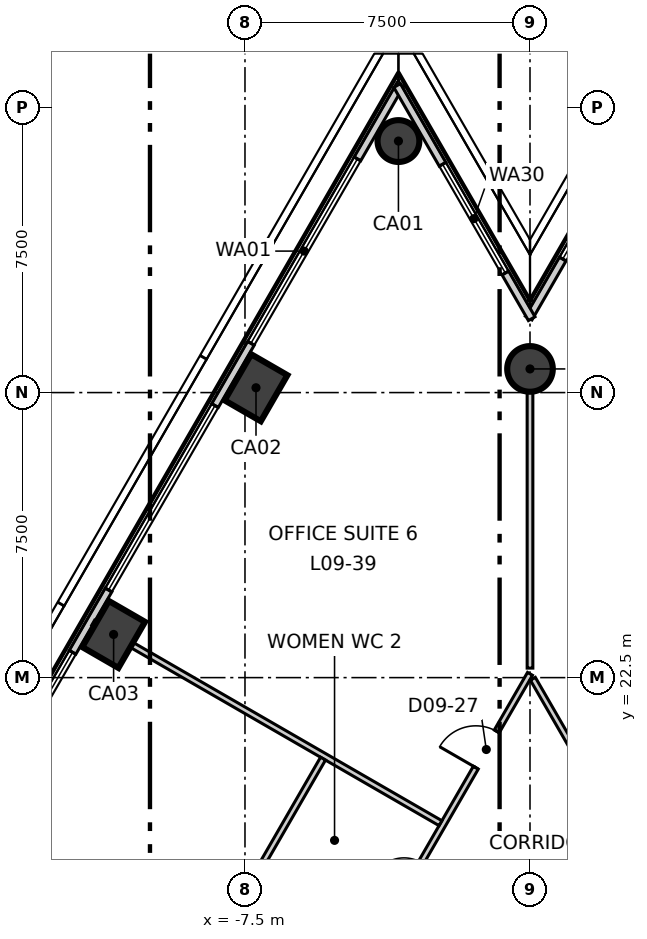
"""IFC4 building model, lengths in metres.
Left out: names, types, materials, properties, quantities, classifications, styles, units other than length and angle.
Written with IfcOpenShell. Run it as: python <this file> out.ifc"""

import sys

from ifc_helpers import new_model, si_unit, direction, frame, frame_2d, origin, origin_2d, place, context, subcontext, project, spatial, rectangle, circle, extrude, element, fill, save


model = new_model("IFC4")
c1 = context("Model", 3, precision=1e-05, world=origin(), true_north=direction((0.0, 1.0)))
c2 = subcontext(c1, "Body", "Model", "MODEL_VIEW")
j1 = project(units=[si_unit("LENGTHUNIT", "METRE"), si_unit("PLANEANGLEUNIT", "RADIAN")], contexts=[c1])
p1 = place(None, origin())
s1 = spatial("IfcSite", under=j1, at=p1, CompositionType="ELEMENT")
p2 = place(p1, origin())
s2 = spatial("IfcBuilding", under=s1, at=p2, CompositionType="ELEMENT")
p3 = place(p2, frame((0.0, 0.0, 47.3)))
s3 = spatial("IfcBuildingStorey", under=s2, at=p3, CompositionType="ELEMENT", Elevation=47.3)
p4 = place(p3, frame((-3.462, 36.618, -0.3), z_axis=(0.0, 0.0, 1.0), x_axis=(0.5, 0.866025403784, 0.0)))
e1 = element("IfcColumn", 1, at=p4, inside=s3, PredefinedType="COLUMN", context=c2, shape_type="SweptSolid", body=[
    extrude(circle(Radius=0.55, at=origin_2d()), origin(), (0.0, 0.0, 1.0), 4.0),
])
for number, where, z_axis, x_axis in (
    (2, (-7.21, 30.127, -0.3), (0.0, 0.0, 1.0), (0.5, 0.866, 0.0)),
    (3, (-10.957, 23.636, -0.3), (0.0, 0.0, 1.0), (0.5, 0.866, 0.0)),
):
    element("IfcColumn", number, at=place(p3, frame(where, z_axis=z_axis, x_axis=x_axis)), inside=s3, PredefinedType="COLUMN", context=c2, shape_type="SweptSolid", body=[
        extrude(rectangle(XDim=1.4, YDim=1.1, at=origin_2d()), origin(), (0.0, 0.0, 1.0), 4.0),
    ])
p5 = place(p3, frame((0.0, 30.622, -0.3), z_axis=(0.0, 0.0, 1.0), x_axis=(1.0, 0.0, 0.0)))
e4 = element("IfcColumn", 4, at=p5, inside=s3, PredefinedType="COLUMN", context=c2, shape_type="SweptSolid", body=[
    extrude(circle(Radius=0.6, at=origin_2d()), origin(), (0.0, 0.0, 1.0), 4.0),
])
p6 = place(p3, frame((-3.417, 38.096, 0.0), z_axis=(0.0, 0.0, 1.0), x_axis=(-0.500000412988, -0.866025165346, 0.0)))
e5 = element("IfcWall", 5, at=p6, inside=s3, PredefinedType="ELEMENTEDWALL", context=c2, shape_type="SweptSolid", body=[
    extrude(rectangle(XDim=62.548, YDim=0.2, at=frame_2d((31.274, 0.0))), origin(), (0.0, 0.0, 1.0), 3.7),
])
p7 = place(p6, frame((2.25, 0.0, 0.9)))
e6 = element("IfcOpeningElement", 6, at=p7, cuts=e5, PredefinedType="OPENING", context=c2, shape_type="SweptSolid", body=[
    extrude(rectangle(XDim=5.6, YDim=2.5, at=frame_2d((2.8, 1.25))), frame((0.0, 0.11, 0.0), z_axis=(0.0, -1.0, 0.0), x_axis=(1.0, 0.0, 0.0)), (0.0, 0.0, 1.0), 0.22),
])
p8 = place(p6, frame((9.745, 0.0, 0.9)))
e7 = element("IfcOpeningElement", 7, at=p8, cuts=e5, PredefinedType="OPENING", context=c2, shape_type="SweptSolid", body=[
    extrude(rectangle(XDim=5.6, YDim=2.5, at=frame_2d((2.8, 1.25))), frame((0.0, 0.11, 0.0), z_axis=(0.0, -1.0, 0.0), x_axis=(1.0, 0.0, 0.0)), (0.0, 0.0, 1.0), 0.22),
])
p9 = place(p6, frame((17.241, 0.0, 0.9)))
e8 = element("IfcOpeningElement", 8, at=p9, cuts=e5, PredefinedType="OPENING", context=c2, shape_type="SweptSolid", body=[
    extrude(rectangle(XDim=5.6, YDim=2.5, at=frame_2d((2.8, 1.25))), frame((0.0, 0.11, 0.0), z_axis=(0.0, -1.0, 0.0), x_axis=(1.0, 0.0, 0.0)), (0.0, 0.0, 1.0), 0.22),
])
p10 = place(p6, frame((24.736, 0.0, 0.9)))
e9 = element("IfcOpeningElement", 9, at=p10, cuts=e5, PredefinedType="OPENING", context=c2, shape_type="SweptSolid", body=[
    extrude(rectangle(XDim=5.6, YDim=2.5, at=frame_2d((2.8, 1.25))), frame((0.0, 0.11, 0.0), z_axis=(0.0, -1.0, 0.0), x_axis=(1.0, 0.0, 0.0)), (0.0, 0.0, 1.0), 0.22),
])
p11 = place(p6, frame((32.231, 0.0, 0.9)))
e10 = element("IfcOpeningElement", 10, at=p11, cuts=e5, PredefinedType="OPENING", context=c2, shape_type="SweptSolid", body=[
    extrude(rectangle(XDim=5.6, YDim=2.5, at=frame_2d((2.8, 1.25))), frame((0.0, 0.11, 0.0), z_axis=(0.0, -1.0, 0.0), x_axis=(1.0, 0.0, 0.0)), (0.0, 0.0, 1.0), 0.22),
])
p12 = place(p6, frame((39.727, 0.0, 0.9)))
e11 = element("IfcOpeningElement", 11, at=p12, cuts=e5, PredefinedType="OPENING", context=c2, shape_type="SweptSolid", body=[
    extrude(rectangle(XDim=5.6, YDim=2.5, at=frame_2d((2.8, 1.25))), frame((0.0, 0.11, 0.0), z_axis=(0.0, -1.0, 0.0), x_axis=(1.0, 0.0, 0.0)), (0.0, 0.0, 1.0), 0.22),
])
p13 = place(p6, frame((47.222, 0.0, 0.9)))
e12 = element("IfcOpeningElement", 12, at=p13, cuts=e5, PredefinedType="OPENING", context=c2, shape_type="SweptSolid", body=[
    extrude(rectangle(XDim=5.6, YDim=2.5, at=frame_2d((2.8, 1.25))), frame((0.0, 0.11, 0.0), z_axis=(0.0, -1.0, 0.0), x_axis=(1.0, 0.0, 0.0)), (0.0, 0.0, 1.0), 0.22),
])
p14 = place(p6, frame((54.717, 0.0, 0.9)))
e13 = element("IfcOpeningElement", 13, at=p14, cuts=e5, PredefinedType="OPENING", context=c2, shape_type="SweptSolid", body=[
    extrude(rectangle(XDim=5.6, YDim=2.5, at=frame_2d((2.8, 1.25))), frame((0.0, 0.11, 0.0), z_axis=(0.0, -1.0, 0.0), x_axis=(1.0, 0.0, 0.0)), (0.0, 0.0, 1.0), 0.22),
])
p15 = place(p3, frame((3.507, 38.096, 0.0), z_axis=(0.0, 0.0, 1.0), x_axis=(-0.499993928037, -0.866028909405, 0.0)))
e14 = element("IfcWall", 14, at=p15, inside=s3, PredefinedType="ELEMENTEDWALL", context=c2, shape_type="SweptSolid", body=[
    extrude(rectangle(XDim=7.084, YDim=0.2, at=frame_2d((3.542, 0.0))), origin(), (0.0, 0.0, 1.0), 3.7),
])
p16 = place(p15, frame((1.99, 0.0, 0.9)))
e15 = element("IfcOpeningElement", 15, at=p16, cuts=e14, PredefinedType="OPENING", context=c2, shape_type="SweptSolid", body=[
    extrude(rectangle(XDim=3.3, YDim=2.5, at=frame_2d((1.65, 1.25))), frame((0.0, 0.11, 0.0), z_axis=(0.0, -1.0, 0.0), x_axis=(1.0, 0.0, 0.0)), (0.0, 0.0, 1.0), 0.22),
])
p17 = place(p3, frame((0.045, 31.944, 0.0), z_axis=(0.0, 0.0, 1.0), x_axis=(-0.499993928037, 0.866028909405, 0.0)))
e16 = element("IfcWall", 16, at=p17, inside=s3, PredefinedType="ELEMENTEDWALL", context=c2, shape_type="SweptSolid", body=[
    extrude(rectangle(XDim=7.084, YDim=0.2, at=frame_2d((3.542, 0.0))), origin(), (0.0, 0.0, 1.0), 3.7),
])
p18 = place(p17, frame((1.39, 0.0, 0.9)))
e17 = element("IfcOpeningElement", 17, at=p18, cuts=e16, PredefinedType="OPENING", context=c2, shape_type="SweptSolid", body=[
    extrude(rectangle(XDim=3.3, YDim=2.5, at=frame_2d((1.65, 1.25))), frame((0.0, 0.11, 0.0), z_axis=(0.0, -1.0, 0.0), x_axis=(1.0, 0.0, 0.0)), (0.0, 0.0, 1.0), 0.22),
])
p19 = place(p3, frame((-19.497, -11.17, 0.0), z_axis=(0.0, 0.0, 1.0), x_axis=(0.499998854553, 0.866026065108, 0.0)))
e18 = element("IfcWall", 18, at=p19, inside=s3, PredefinedType="PARTITIONING", context=c2, shape_type="SweptSolid", body=[
    extrude(rectangle(XDim=38.994, YDim=0.15, at=frame_2d((19.497, 0.0))), origin(), (0.0, 0.0, 1.0), 3.7),
])
p20 = place(p19, frame((36.144, 0.0, 0.0)))
e19 = element("IfcOpeningElement", 19, at=p20, cuts=e18, PredefinedType="OPENING", context=c2, shape_type="SweptSolid", body=[
    extrude(rectangle(XDim=1.1, YDim=2.1, at=frame_2d((0.55, 1.05))), frame((0.0, 0.085, 0.0), z_axis=(0.0, -1.0, 0.0), x_axis=(1.0, 0.0, 0.0)), (0.0, 0.0, 1.0), 0.17),
])
p21 = place(p19, frame((21.963, 0.0, 0.0)))
e20 = element("IfcOpeningElement", 20, at=p21, cuts=e18, PredefinedType="OPENING", context=c2, shape_type="SweptSolid", body=[
    extrude(rectangle(XDim=1.1, YDim=2.1, at=frame_2d((0.55, 1.05))), frame((0.0, 0.085, 0.0), z_axis=(0.0, -1.0, 0.0), x_axis=(1.0, 0.0, 0.0)), (0.0, 0.0, 1.0), 0.17),
])
p22 = place(p19, frame((32.363, 0.0, 0.0)))
e21 = element("IfcOpeningElement", 21, at=p22, cuts=e18, PredefinedType="OPENING", context=c2, shape_type="SweptSolid", body=[
    extrude(rectangle(XDim=0.9, YDim=2.1, at=frame_2d((0.45, 1.05))), frame((0.0, 0.085, 0.0), z_axis=(0.0, -1.0, 0.0), x_axis=(1.0, 0.0, 0.0)), (0.0, 0.0, 1.0), 0.17),
])
p23 = place(p19, frame((29.163, 0.0, 0.0)))
e22 = element("IfcOpeningElement", 22, at=p23, cuts=e18, PredefinedType="OPENING", context=c2, shape_type="SweptSolid", body=[
    extrude(rectangle(XDim=0.9, YDim=2.1, at=frame_2d((0.45, 1.05))), frame((0.0, 0.085, 0.0), z_axis=(0.0, -1.0, 0.0), x_axis=(1.0, 0.0, 0.0)), (0.0, 0.0, 1.0), 0.17),
])
p24 = place(p19, frame((26.263, 0.0, 0.0)))
e23 = element("IfcOpeningElement", 23, at=p24, cuts=e18, PredefinedType="OPENING", context=c2, shape_type="SweptSolid", body=[
    extrude(rectangle(XDim=1.0, YDim=2.1, at=frame_2d((0.5, 1.05))), frame((0.0, 0.085, 0.0), z_axis=(0.0, -1.0, 0.0), x_axis=(1.0, 0.0, 0.0)), (0.0, 0.0, 1.0), 0.17),
])
p25 = place(p19, frame((11.373, 0.0, 0.0)))
e24 = element("IfcOpeningElement", 24, at=p25, cuts=e18, PredefinedType="OPENING", context=c2, shape_type="SweptSolid", body=[
    extrude(rectangle(XDim=1.1, YDim=2.1, at=frame_2d((0.55, 1.05))), frame((0.0, 0.085, 0.0), z_axis=(0.0, -1.0, 0.0), x_axis=(1.0, 0.0, 0.0)), (0.0, 0.0, 1.0), 0.17),
])
p26 = place(p19, frame((1.581, 0.0, 0.0)))
e25 = element("IfcOpeningElement", 25, at=p26, cuts=e18, PredefinedType="OPENING", context=c2, shape_type="SweptSolid", body=[
    extrude(rectangle(XDim=1.1, YDim=2.1, at=frame_2d((0.55, 1.05))), frame((0.0, 0.085, 0.0), z_axis=(0.0, -1.0, 0.0), x_axis=(1.0, 0.0, 0.0)), (0.0, 0.0, 1.0), 0.17),
])
p27 = place(p3, frame((-11.494, 23.946, 0.0), z_axis=(0.0, 0.0, 1.0), x_axis=(0.866011810196, -0.500023544047, 0.0)))
e26 = element("IfcWall", 26, at=p27, inside=s3, PredefinedType="PARTITIONING", context=c2, shape_type="SweptSolid", body=[
    extrude(rectangle(XDim=10.552, YDim=0.15, at=frame_2d((5.276, 0.0))), origin(), (0.0, 0.0, 1.0), 3.7),
])
p28 = place(p3, frame((-9.808, 12.811, 0.0), z_axis=(0.0, 0.0, 1.0), x_axis=(0.49992187278, 0.866070505857, 0.0)))
e27 = element("IfcWall", 27, at=p28, inside=s3, PredefinedType="PARTITIONING", context=c2, shape_type="SweptSolid", body=[
    extrude(rectangle(XDim=8.726, YDim=0.15, at=frame_2d((4.363, 0.0))), origin(), (0.0, 0.0, 1.0), 3.7),
])
p29 = place(p3, frame((0.0, 22.75, 0.0), z_axis=(0.0, 0.0, 1.0), x_axis=(0.0, 1.0, 0.0)))
e28 = element("IfcWall", 28, at=p29, inside=s3, PredefinedType="PARTITIONING", context=c2, shape_type="SweptSolid", body=[
    extrude(rectangle(XDim=8.492, YDim=0.15, at=frame_2d((4.246, 0.0))), origin(), (0.0, 0.0, 1.0), 3.1),
])
p30 = place(p3, frame((0.075, 22.47, 0.0), z_axis=(0.0, 0.0, 1.0), x_axis=(0.500002280369, -0.866024087209, 0.0)))
e29 = element("IfcWall", 29, at=p30, inside=s3, PredefinedType="PARTITIONING", context=c2, shape_type="SweptSolid", body=[
    extrude(rectangle(XDim=38.844, YDim=0.15, at=frame_2d((19.422, 0.0))), origin(), (0.0, 0.0, 1.0), 3.7),
])
p31 = place(p30, frame((36.244, 0.0, 0.0)))
e30 = element("IfcOpeningElement", 30, at=p31, cuts=e29, PredefinedType="OPENING", context=c2, shape_type="SweptSolid", body=[
    extrude(rectangle(XDim=1.0, YDim=2.1, at=frame_2d((0.5, 1.05))), frame((0.0, 0.085, 0.0), z_axis=(0.0, -1.0, 0.0), x_axis=(1.0, 0.0, 0.0)), (0.0, 0.0, 1.0), 0.17),
])
p32 = place(p30, frame((21.963, 0.0, 0.0)))
e31 = element("IfcOpeningElement", 31, at=p32, cuts=e29, PredefinedType="OPENING", context=c2, shape_type="SweptSolid", body=[
    extrude(rectangle(XDim=1.1, YDim=2.1, at=frame_2d((0.55, 1.05))), frame((0.0, 0.085, 0.0), z_axis=(0.0, -1.0, 0.0), x_axis=(1.0, 0.0, 0.0)), (0.0, 0.0, 1.0), 0.17),
])
p33 = place(p30, frame((32.363, 0.0, 0.0)))
e32 = element("IfcOpeningElement", 32, at=p33, cuts=e29, PredefinedType="OPENING", context=c2, shape_type="SweptSolid", body=[
    extrude(rectangle(XDim=0.9, YDim=2.1, at=frame_2d((0.45, 1.05))), frame((0.0, 0.085, 0.0), z_axis=(0.0, -1.0, 0.0), x_axis=(1.0, 0.0, 0.0)), (0.0, 0.0, 1.0), 0.17),
])
p34 = place(p30, frame((29.163, 0.0, 0.0)))
e33 = element("IfcOpeningElement", 33, at=p34, cuts=e29, PredefinedType="OPENING", context=c2, shape_type="SweptSolid", body=[
    extrude(rectangle(XDim=0.9, YDim=2.1, at=frame_2d((0.45, 1.05))), frame((0.0, 0.085, 0.0), z_axis=(0.0, -1.0, 0.0), x_axis=(1.0, 0.0, 0.0)), (0.0, 0.0, 1.0), 0.17),
])
p35 = place(p30, frame((26.263, 0.0, 0.0)))
e34 = element("IfcOpeningElement", 34, at=p35, cuts=e29, PredefinedType="OPENING", context=c2, shape_type="SweptSolid", body=[
    extrude(rectangle(XDim=1.0, YDim=2.1, at=frame_2d((0.5, 1.05))), frame((0.0, 0.085, 0.0), z_axis=(0.0, -1.0, 0.0), x_axis=(1.0, 0.0, 0.0)), (0.0, 0.0, 1.0), 0.17),
])
p36 = place(p30, frame((9.071, 0.0, 0.0)))
e35 = element("IfcOpeningElement", 35, at=p36, cuts=e29, PredefinedType="OPENING", context=c2, shape_type="SweptSolid", body=[
    extrude(rectangle(XDim=1.1, YDim=2.1, at=frame_2d((0.55, 1.05))), frame((0.0, 0.085, 0.0), z_axis=(0.0, -1.0, 0.0), x_axis=(1.0, 0.0, 0.0)), (0.0, 0.0, 1.0), 0.17),
])
p37 = place(p7, origin())
e36 = element("IfcWindow", 36, at=p37, inside=s3, PartitioningType="SINGLE_PANEL", PredefinedType="WINDOW", context=c2, shape_type="SweptSolid", body=[
    extrude(rectangle(XDim=5.6, YDim=2.5, at=frame_2d((2.8, 1.25))), frame((0.0, 0.03, 0.0), z_axis=(0.0, -1.0, 0.0), x_axis=(1.0, 0.0, 0.0)), (0.0, 0.0, 1.0), 0.06),
])
fill(e6, e36)
p38 = place(p8, origin())
e37 = element("IfcWindow", 37, at=p38, inside=s3, PartitioningType="SINGLE_PANEL", PredefinedType="WINDOW", context=c2, shape_type="SweptSolid", body=[
    extrude(rectangle(XDim=5.6, YDim=2.5, at=frame_2d((2.8, 1.25))), frame((0.0, 0.03, 0.0), z_axis=(0.0, -1.0, 0.0), x_axis=(1.0, 0.0, 0.0)), (0.0, 0.0, 1.0), 0.06),
])
fill(e7, e37)
p39 = place(p9, origin())
e38 = element("IfcWindow", 38, at=p39, inside=s3, PartitioningType="SINGLE_PANEL", PredefinedType="WINDOW", context=c2, shape_type="SweptSolid", body=[
    extrude(rectangle(XDim=5.6, YDim=2.5, at=frame_2d((2.8, 1.25))), frame((0.0, 0.03, 0.0), z_axis=(0.0, -1.0, 0.0), x_axis=(1.0, 0.0, 0.0)), (0.0, 0.0, 1.0), 0.06),
])
fill(e8, e38)
p40 = place(p16, origin())
e39 = element("IfcWindow", 39, at=p40, inside=s3, PartitioningType="SINGLE_PANEL", PredefinedType="WINDOW", context=c2, shape_type="SweptSolid", body=[
    extrude(rectangle(XDim=3.3, YDim=2.5, at=frame_2d((1.65, 1.25))), frame((0.0, 0.03, 0.0), z_axis=(0.0, -1.0, 0.0), x_axis=(1.0, 0.0, 0.0)), (0.0, 0.0, 1.0), 0.06),
])
fill(e15, e39)
p41 = place(p18, origin())
e40 = element("IfcWindow", 40, at=p41, inside=s3, PartitioningType="SINGLE_PANEL", PredefinedType="WINDOW", context=c2, shape_type="SweptSolid", body=[
    extrude(rectangle(XDim=3.3, YDim=2.5, at=frame_2d((1.65, 1.25))), frame((0.0, 0.03, 0.0), z_axis=(0.0, -1.0, 0.0), x_axis=(1.0, 0.0, 0.0)), (0.0, 0.0, 1.0), 0.06),
])
fill(e17, e40)
p42 = place(p20, origin())
e41 = element("IfcDoor", 41, at=p42, inside=s3, OperationType="SINGLE_SWING_RIGHT", PredefinedType="DOOR", context=c2, shape_type="SweptSolid", body=[
    extrude(rectangle(XDim=1.1, YDim=2.1, at=frame_2d((0.55, 1.05))), frame((0.0, 0.025, 0.0), z_axis=(0.0, -1.0, 0.0), x_axis=(1.0, 0.0, 0.0)), (0.0, 0.0, 1.0), 0.05),
])
fill(e19, e41)
save(model, sys.argv[1])
